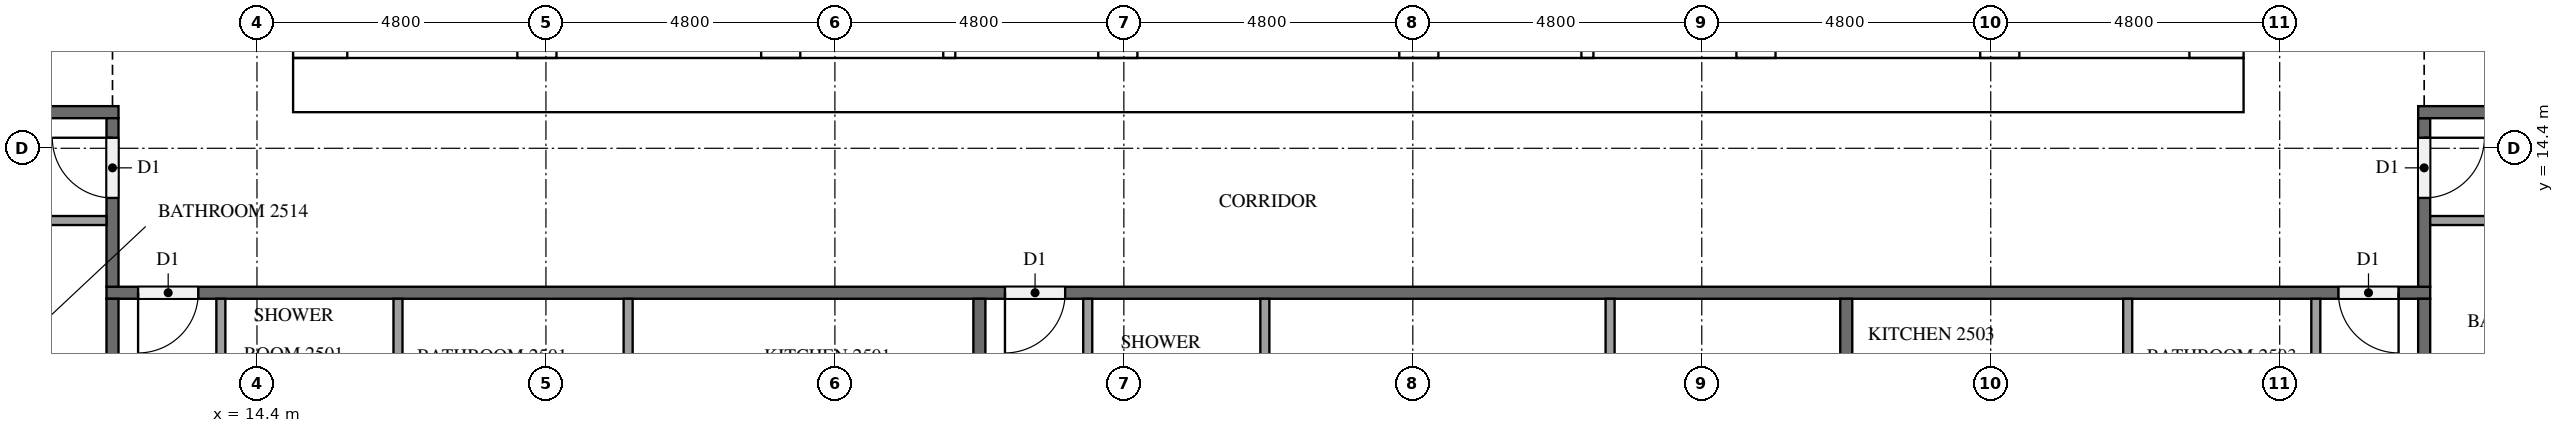
"""IFC4 building model, lengths in metres.
Left out: names, types, materials, properties, quantities, classifications, styles, units other than length and angle.
Written with IfcOpenShell. Run it as: python <this file> out.ifc"""

import sys

from ifc_helpers import new_model, si_unit, direction, frame, frame_2d, origin, place, context, subcontext, project, spatial, rectangle, extrude, element, fill, save


model = new_model("IFC4")
c1 = context("Model", 3, precision=1e-05, world=origin(), true_north=direction((0.0, 1.0)))
c2 = subcontext(c1, "Body", "Model", "MODEL_VIEW")
j1 = project(units=[si_unit("LENGTHUNIT", "METRE"), si_unit("PLANEANGLEUNIT", "RADIAN")], contexts=[c1])
p1 = place(None, origin())
s1 = spatial("IfcSite", under=j1, at=p1, CompositionType="ELEMENT")
p2 = place(p1, origin())
s2 = spatial("IfcBuilding", under=s1, at=p2, CompositionType="ELEMENT")
p3 = place(p2, frame((0.0, 0.0, 99.7)))
s3 = spatial("IfcBuildingStorey", under=s2, at=p3, CompositionType="ELEMENT", Elevation=99.7)
p4 = place(p3, frame((15.0, 15.45, 0.0), z_axis=(0.0, 0.0, 1.0), x_axis=(1.0, 0.0, 0.0)))
e1 = element("IfcWall", 1, at=p4, inside=s3, PredefinedType="SHEAR", context=c2, shape_type="SweptSolid", body=[
    extrude(rectangle(XDim=32.4, YDim=0.9, at=frame_2d((16.2, 0.0))), origin(), (0.0, 0.0, 1.0), 3.2),
])
p5 = place(p4, frame((15.3, 0.0, 0.0)))
e2 = element("IfcOpeningElement", 2, at=p5, cuts=e1, PredefinedType="OPENING", context=c2, shape_type="SweptSolid", body=[
    extrude(rectangle(XDim=1.8, YDim=2.1, at=frame_2d((0.9, 1.05))), frame((0.0, 0.46, 0.0), z_axis=(0.0, -1.0, 0.0), x_axis=(1.0, 0.0, 0.0)), (0.0, 0.0, 1.0), 0.92),
])
p6 = place(p3, frame((15.45, 15.9, 0.0), z_axis=(0.0, 0.0, 1.0), x_axis=(0.0, 1.0, 0.0)))
e3 = element("IfcWall", 3, at=p6, inside=s3, PredefinedType="SHEAR", context=c2, shape_type="SweptSolid", body=[
    extrude(rectangle(XDim=21.0, YDim=0.9, at=frame_2d((10.5, 0.0))), origin(), (0.0, 0.0, 1.0), 3.2),
])
p7 = place(p6, frame((4.86, 0.0, 0.0)))
e4 = element("IfcOpeningElement", 4, at=p7, cuts=e3, PredefinedType="OPENING", context=c2, shape_type="SweptSolid", body=[
    extrude(rectangle(XDim=1.2, YDim=2.1, at=frame_2d((0.6, 1.05))), frame((0.0, 0.46, 0.0), z_axis=(0.0, -1.0, 0.0), x_axis=(1.0, 0.0, 0.0)), (0.0, 0.0, 1.0), 0.92),
])
p8 = place(p3, frame((46.95, 15.9, 0.0), z_axis=(0.0, 0.0, 1.0), x_axis=(0.0, 1.0, 0.0)))
e5 = element("IfcWall", 5, at=p8, inside=s3, PredefinedType="SHEAR", context=c2, shape_type="SweptSolid", body=[
    extrude(rectangle(XDim=21.0, YDim=0.9, at=frame_2d((10.5, 0.0))), origin(), (0.0, 0.0, 1.0), 3.2),
])
p9 = place(p8, frame((10.2, 0.0, 0.0)))
e6 = element("IfcOpeningElement", 6, at=p9, cuts=e5, PredefinedType="OPENING", context=c2, shape_type="SweptSolid", body=[
    extrude(rectangle(XDim=1.2, YDim=2.1, at=frame_2d((0.6, 1.05))), frame((0.0, 0.46, 0.0), z_axis=(0.0, -1.0, 0.0), x_axis=(1.0, 0.0, 0.0)), (0.0, 0.0, 1.0), 0.92),
])
p10 = place(p3, frame((19.05, 15.9, 0.0), z_axis=(0.0, 0.0, 1.0), x_axis=(0.0, 1.0, 0.0)))
e7 = element("IfcWall", 7, at=p10, inside=s3, PredefinedType="SHEAR", context=c2, shape_type="SweptSolid", body=[
    extrude(rectangle(XDim=15.025, YDim=0.65, at=frame_2d((7.513, 0.0))), origin(), (0.0, 0.0, 1.0), 3.2),
])
p11 = place(p10, frame((9.55, 0.0, 0.0)))
e8 = element("IfcOpeningElement", 8, at=p11, cuts=e7, PredefinedType="OPENING", context=c2, shape_type="SweptSolid", body=[
    extrude(rectangle(XDim=1.1, YDim=2.1, at=frame_2d((0.55, 1.05))), frame((0.0, 0.335, 0.0), z_axis=(0.0, -1.0, 0.0), x_axis=(1.0, 0.0, 0.0)), (0.0, 0.0, 1.0), 0.67),
])
p12 = place(p10, frame((13.05, 0.0, 0.0)))
e9 = element("IfcOpeningElement", 9, at=p12, cuts=e7, PredefinedType="OPENING", context=c2, shape_type="SweptSolid", body=[
    extrude(rectangle(XDim=1.1, YDim=2.1, at=frame_2d((0.55, 1.05))), frame((0.0, 0.335, 0.0), z_axis=(0.0, -1.0, 0.0), x_axis=(1.0, 0.0, 0.0)), (0.0, 0.0, 1.0), 0.67),
])
p13 = place(p10, frame((0.3, 0.0, 0.0)))
e10 = element("IfcOpeningElement", 10, at=p13, cuts=e7, PredefinedType="OPENING", context=c2, shape_type="SweptSolid", body=[
    extrude(rectangle(XDim=1.2, YDim=2.1, at=frame_2d((0.6, 1.05))), frame((0.0, 0.335, 0.0), z_axis=(0.0, -1.0, 0.0), x_axis=(1.0, 0.0, 0.0)), (0.0, 0.0, 1.0), 0.67),
])
p14 = place(p3, frame((23.1, 15.9, 0.0), z_axis=(0.0, 0.0, 1.0), x_axis=(0.0, 1.0, 0.0)))
e11 = element("IfcWall", 11, at=p14, inside=s3, PredefinedType="SHEAR", context=c2, shape_type="SweptSolid", body=[
    extrude(rectangle(XDim=21.0, YDim=0.65, at=frame_2d((10.5, 0.0))), origin(), (0.0, 0.0, 1.0), 3.2),
])
p15 = place(p3, frame((39.3, 15.9, 0.0), z_axis=(0.0, 0.0, 1.0), x_axis=(0.0, 1.0, 0.0)))
e12 = element("IfcWall", 12, at=p15, inside=s3, PredefinedType="SHEAR", context=c2, shape_type="SweptSolid", body=[
    extrude(rectangle(XDim=8.35, YDim=0.65, at=frame_2d((4.175, 0.0))), origin(), (0.0, 0.0, 1.0), 3.2),
])
p16 = place(p3, frame((43.35, 15.9, 0.0), z_axis=(0.0, 0.0, 1.0), x_axis=(0.0, 1.0, 0.0)))
e13 = element("IfcWall", 13, at=p16, inside=s3, PredefinedType="SHEAR", context=c2, shape_type="SweptSolid", body=[
    extrude(rectangle(XDim=8.35, YDim=0.65, at=frame_2d((4.175, 0.0))), origin(), (0.0, 0.0, 1.0), 3.2),
])
p17 = place(p16, frame((0.3, 0.0, 0.0)))
e14 = element("IfcOpeningElement", 14, at=p17, cuts=e13, PredefinedType="OPENING", context=c2, shape_type="SweptSolid", body=[
    extrude(rectangle(XDim=1.2, YDim=2.1, at=frame_2d((0.6, 1.05))), frame((0.0, 0.335, 0.0), z_axis=(0.0, -1.0, 0.0), x_axis=(1.0, 0.0, 0.0)), (0.0, 0.0, 1.0), 0.67),
])
for number, where, z_axis, x_axis in (
    (15, (28.7, 15.9, 0.0), (0.0, 0.0, 1.0), (0.0, 1.0, 0.0)),
    (16, (33.7, 15.9, 0.0), (0.0, 0.0, 1.0), (0.0, 1.0, 0.0)),
):
    element("IfcWall", number, at=place(p3, frame(where, z_axis=z_axis, x_axis=x_axis)), inside=s3, PredefinedType="SHEAR", context=c2, shape_type="SweptSolid", body=[
        extrude(rectangle(XDim=2.525, YDim=0.65, at=frame_2d((1.263, 0.0))), origin(), (0.0, 0.0, 1.0), 3.2),
    ])
for number, where, z_axis, x_axis in (
    (17, (25.9, 15.9, 0.0), (0.0, 0.0, 1.0), (0.0, 1.0, 0.0)),
    (18, (36.5, 15.9, 0.0), (0.0, 0.0, 1.0), (0.0, 1.0, 0.0)),
):
    element("IfcWall", number, at=place(p3, frame(where, z_axis=z_axis, x_axis=x_axis)), inside=s3, PredefinedType="SOLIDWALL", context=c2, shape_type="SweptSolid", body=[
        extrude(rectangle(XDim=2.525, YDim=0.2, at=frame_2d((1.263, 0.0))), origin(), (0.0, 0.0, 1.0), 3.2),
    ])
p18 = place(p3, frame((50.5, 12.0, 0.0), z_axis=(0.0, 0.0, 1.0), x_axis=(-1.0, 0.0, 0.0)))
e19 = element("IfcWall", 19, at=p18, inside=s3, PredefinedType="PARTITIONING", context=c2, shape_type="SweptSolid", body=[
    extrude(rectangle(XDim=38.6, YDim=0.2, at=frame_2d((19.3, 0.0))), origin(), (0.0, 0.0, 1.0), 3.2),
])
p19 = place(p18, frame((37.075, 0.0, 0.0)))
e20 = element("IfcOpeningElement", 20, at=p19, cuts=e19, PredefinedType="OPENING", context=c2, shape_type="SweptSolid", body=[
    extrude(rectangle(XDim=1.0, YDim=2.1, at=frame_2d((0.5, 1.05))), frame((0.0, 0.11, 0.0), z_axis=(0.0, -1.0, 0.0), x_axis=(1.0, 0.0, 0.0)), (0.0, 0.0, 1.0), 0.22),
])
p20 = place(p18, frame((22.675, 0.0, 0.0)))
e21 = element("IfcOpeningElement", 21, at=p20, cuts=e19, PredefinedType="OPENING", context=c2, shape_type="SweptSolid", body=[
    extrude(rectangle(XDim=1.0, YDim=2.1, at=frame_2d((0.5, 1.05))), frame((0.0, 0.11, 0.0), z_axis=(0.0, -1.0, 0.0), x_axis=(1.0, 0.0, 0.0)), (0.0, 0.0, 1.0), 0.22),
])
p21 = place(p18, frame((0.525, 0.0, 0.0)))
e22 = element("IfcOpeningElement", 22, at=p21, cuts=e19, PredefinedType="OPENING", context=c2, shape_type="SweptSolid", body=[
    extrude(rectangle(XDim=1.0, YDim=2.1, at=frame_2d((0.5, 1.05))), frame((0.0, 0.11, 0.0), z_axis=(0.0, -1.0, 0.0), x_axis=(1.0, 0.0, 0.0)), (0.0, 0.0, 1.0), 0.22),
])
p22 = place(p3, frame((50.4, 14.9, 0.0), z_axis=(0.0, 0.0, 1.0), x_axis=(0.0, -1.0, 0.0)))
e23 = element("IfcWall", 23, at=p22, inside=s3, PredefinedType="PARTITIONING", context=c2, shape_type="SweptSolid", body=[
    extrude(rectangle(XDim=2.8, YDim=0.2, at=frame_2d((1.4, 0.0))), origin(), (0.0, 0.0, 1.0), 3.2),
])
p23 = place(p22, frame((0.325, 0.0, 0.0)))
e24 = element("IfcOpeningElement", 24, at=p23, cuts=e23, PredefinedType="OPENING", context=c2, shape_type="SweptSolid", body=[
    extrude(rectangle(XDim=1.0, YDim=2.1, at=frame_2d((0.5, 1.05))), frame((0.0, 0.11, 0.0), z_axis=(0.0, -1.0, 0.0), x_axis=(1.0, 0.0, 0.0)), (0.0, 0.0, 1.0), 0.22),
])
p24 = place(p3, frame((50.3, 15.0, 0.0), z_axis=(0.0, 0.0, 1.0), x_axis=(1.0, 0.0, 0.0)))
e25 = element("IfcWall", 25, at=p24, inside=s3, PredefinedType="PARTITIONING", context=c2, shape_type="SweptSolid", body=[
    extrude(rectangle(XDim=2.2, YDim=0.2, at=frame_2d((1.1, 0.0))), origin(), (0.0, 0.0, 1.0), 3.2),
])
p25 = place(p3, frame((9.9, 15.0, 0.0), z_axis=(0.0, 0.0, 1.0), x_axis=(1.0, 0.0, 0.0)))
e26 = element("IfcWall", 26, at=p25, inside=s3, PredefinedType="PARTITIONING", context=c2, shape_type="SweptSolid", body=[
    extrude(rectangle(XDim=2.2, YDim=0.2, at=frame_2d((1.1, 0.0))), origin(), (0.0, 0.0, 1.0), 3.2),
])
p26 = place(p3, frame((12.0, 12.1, 0.0), z_axis=(0.0, 0.0, 1.0), x_axis=(0.0, 1.0, 0.0)))
e27 = element("IfcWall", 27, at=p26, inside=s3, PredefinedType="PARTITIONING", context=c2, shape_type="SweptSolid", body=[
    extrude(rectangle(XDim=2.8, YDim=0.2, at=frame_2d((1.4, 0.0))), origin(), (0.0, 0.0, 1.0), 3.2),
])
p27 = place(p26, frame((1.475, 0.0, 0.0)))
e28 = element("IfcOpeningElement", 28, at=p27, cuts=e27, PredefinedType="OPENING", context=c2, shape_type="SweptSolid", body=[
    extrude(rectangle(XDim=1.0, YDim=2.1, at=frame_2d((0.5, 1.05))), frame((0.0, 0.11, 0.0), z_axis=(0.0, -1.0, 0.0), x_axis=(1.0, 0.0, 0.0)), (0.0, 0.0, 1.0), 0.22),
])
for number, where, z_axis, x_axis in (
    (29, (26.4, 11.9, 0.0), (0.0, 0.0, 1.0), (0.0, -1.0, 0.0)),
    (30, (12.0, 4.9, 0.0), (0.0, 0.0, 1.0), (0.0, 1.0, 0.0)),
    (31, (40.8, 11.9, 0.0), (0.0, 0.0, 1.0), (0.0, -1.0, 0.0)),
    (32, (50.4, 11.9, 0.0), (0.0, 0.0, 1.0), (0.0, -1.0, 0.0)),
):
    element("IfcWall", number, at=place(p3, frame(where, z_axis=z_axis, x_axis=x_axis)), inside=s3, PredefinedType="PARTITIONING", context=c2, shape_type="SweptSolid", body=[
        extrude(rectangle(XDim=7.0, YDim=0.2, at=frame_2d((3.5, 0.0))), origin(), (0.0, 0.0, 1.0), 3.2),
    ])
for number, where, z_axis, x_axis in (
    (33, (16.742, 11.9, 0.0), (0.0, 0.0, 1.0), (0.0, -1.0, 0.0)),
    (34, (20.565, 11.9, 0.0), (0.0, 0.0, 1.0), (0.0, -1.0, 0.0)),
):
    element("IfcWall", number, at=place(p3, frame(where, z_axis=z_axis, x_axis=x_axis)), inside=s3, PredefinedType="PARTITIONING", context=c2, shape_type="SweptSolid", body=[
        extrude(rectangle(XDim=1.925, YDim=0.15, at=frame_2d((0.962, 0.0))), origin(), (0.0, 0.0, 1.0), 3.2),
    ])
p28 = place(p3, frame((13.8, 11.9, 0.0), z_axis=(0.0, 0.0, 1.0), x_axis=(0.0, -1.0, 0.0)))
e35 = element("IfcWall", 35, at=p28, inside=s3, PredefinedType="PARTITIONING", context=c2, shape_type="SweptSolid", body=[
    extrude(rectangle(XDim=2.075, YDim=0.15, at=frame_2d((1.038, 0.0))), origin(), (0.0, 0.0, 1.0), 3.2),
])
for number, where, z_axis, x_axis in (
    (36, (31.142, 11.9, 0.0), (0.0, 0.0, 1.0), (0.0, -1.0, 0.0)),
    (37, (36.877, 11.9, 0.0), (0.0, 0.0, 1.0), (0.0, -1.0, 0.0)),
):
    element("IfcWall", number, at=place(p3, frame(where, z_axis=z_axis, x_axis=x_axis)), inside=s3, PredefinedType="PARTITIONING", context=c2, shape_type="SweptSolid", body=[
        extrude(rectangle(XDim=2.375, YDim=0.15, at=frame_2d((1.188, 0.0))), origin(), (0.0, 0.0, 1.0), 3.2),
    ])
p29 = place(p3, frame((28.2, 11.9, 0.0), z_axis=(0.0, 0.0, 1.0), x_axis=(0.0, -1.0, 0.0)))
e38 = element("IfcWall", 38, at=p29, inside=s3, PredefinedType="PARTITIONING", context=c2, shape_type="SweptSolid", body=[
    extrude(rectangle(XDim=2.525, YDim=0.15, at=frame_2d((1.262, 0.0))), origin(), (0.0, 0.0, 1.0), 3.2),
])
p30 = place(p3, frame((45.475, 11.9, 0.0), z_axis=(0.0, 0.0, 1.0), x_axis=(0.0, -1.0, 0.0)))
e39 = element("IfcWall", 39, at=p30, inside=s3, PredefinedType="PARTITIONING", context=c2, shape_type="SweptSolid", body=[
    extrude(rectangle(XDim=1.925, YDim=0.15, at=frame_2d((0.962, 0.0))), origin(), (0.0, 0.0, 1.0), 3.2),
])
p31 = place(p3, frame((48.6, 11.9, 0.0), z_axis=(0.0, 0.0, 1.0), x_axis=(0.0, -1.0, 0.0)))
e40 = element("IfcWall", 40, at=p31, inside=s3, PredefinedType="PARTITIONING", context=c2, shape_type="SweptSolid", body=[
    extrude(rectangle(XDim=2.075, YDim=0.15, at=frame_2d((1.038, 0.0))), origin(), (0.0, 0.0, 1.0), 3.2),
])
p32 = place(p3, frame((50.5, 13.2, 0.0), z_axis=(0.0, 0.0, 1.0), x_axis=(1.0, 0.0, 0.0)))
e41 = element("IfcWall", 41, at=p32, inside=s3, PredefinedType="PARTITIONING", context=c2, shape_type="SweptSolid", body=[
    extrude(rectangle(XDim=3.875, YDim=0.15, at=frame_2d((1.938, 0.0))), origin(), (0.0, 0.0, 1.0), 3.2),
])
p33 = place(p3, frame((11.9, 13.2, 0.0), z_axis=(0.0, 0.0, 1.0), x_axis=(-1.0, 0.0, 0.0)))
e42 = element("IfcWall", 42, at=p33, inside=s3, PredefinedType="PARTITIONING", context=c2, shape_type="SweptSolid", body=[
    extrude(rectangle(XDim=2.225, YDim=0.15, at=frame_2d((1.112, 0.0))), origin(), (0.0, 0.0, 1.0), 3.2),
])
p34 = place(p5, frame((1.8, 0.0, 0.0), z_axis=(0.0, 0.0, 1.0), x_axis=(-1.0, 0.0, 0.0)))
e43 = element("IfcDoor", 43, at=p34, inside=s3, OperationType="DOUBLE_DOOR_SINGLE_SWING", PredefinedType="DOOR", context=c2, shape_type="SweptSolid", body=[
    extrude(rectangle(XDim=1.8, YDim=2.1, at=frame_2d((0.9, 1.05))), frame((0.0, 0.025, 0.0), z_axis=(0.0, -1.0, 0.0), x_axis=(1.0, 0.0, 0.0)), (0.0, 0.0, 1.0), 0.05),
])
fill(e2, e43)
p35 = place(p19, origin())
e44 = element("IfcDoor", 44, at=p35, inside=s3, OperationType="SINGLE_SWING_RIGHT", PredefinedType="DOOR", context=c2, shape_type="SweptSolid", body=[
    extrude(rectangle(XDim=1.0, YDim=2.1, at=frame_2d((0.5, 1.05))), frame((0.0, 0.025, 0.0), z_axis=(0.0, -1.0, 0.0), x_axis=(1.0, 0.0, 0.0)), (0.0, 0.0, 1.0), 0.05),
])
fill(e20, e44)
p36 = place(p20, origin())
e45 = element("IfcDoor", 45, at=p36, inside=s3, OperationType="SINGLE_SWING_RIGHT", PredefinedType="DOOR", context=c2, shape_type="SweptSolid", body=[
    extrude(rectangle(XDim=1.0, YDim=2.1, at=frame_2d((0.5, 1.05))), frame((0.0, 0.025, 0.0), z_axis=(0.0, -1.0, 0.0), x_axis=(1.0, 0.0, 0.0)), (0.0, 0.0, 1.0), 0.05),
])
fill(e21, e45)
p37 = place(p21, origin())
e46 = element("IfcDoor", 46, at=p37, inside=s3, OperationType="SINGLE_SWING_LEFT", PredefinedType="DOOR", context=c2, shape_type="SweptSolid", body=[
    extrude(rectangle(XDim=1.0, YDim=2.1, at=frame_2d((0.5, 1.05))), frame((0.0, 0.025, 0.0), z_axis=(0.0, -1.0, 0.0), x_axis=(1.0, 0.0, 0.0)), (0.0, 0.0, 1.0), 0.05),
])
fill(e22, e46)
p38 = place(p23, origin())
e47 = element("IfcDoor", 47, at=p38, inside=s3, OperationType="SINGLE_SWING_LEFT", PredefinedType="DOOR", context=c2, shape_type="SweptSolid", body=[
    extrude(rectangle(XDim=1.0, YDim=2.1, at=frame_2d((0.5, 1.05))), frame((0.0, 0.025, 0.0), z_axis=(0.0, -1.0, 0.0), x_axis=(1.0, 0.0, 0.0)), (0.0, 0.0, 1.0), 0.05),
])
fill(e24, e47)
p39 = place(p27, origin())
e48 = element("IfcDoor", 48, at=p39, inside=s3, OperationType="SINGLE_SWING_RIGHT", PredefinedType="DOOR", context=c2, shape_type="SweptSolid", body=[
    extrude(rectangle(XDim=1.0, YDim=2.1, at=frame_2d((0.5, 1.05))), frame((0.0, 0.025, 0.0), z_axis=(0.0, -1.0, 0.0), x_axis=(1.0, 0.0, 0.0)), (0.0, 0.0, 1.0), 0.05),
])
fill(e28, e48)
save(model, sys.argv[1])
